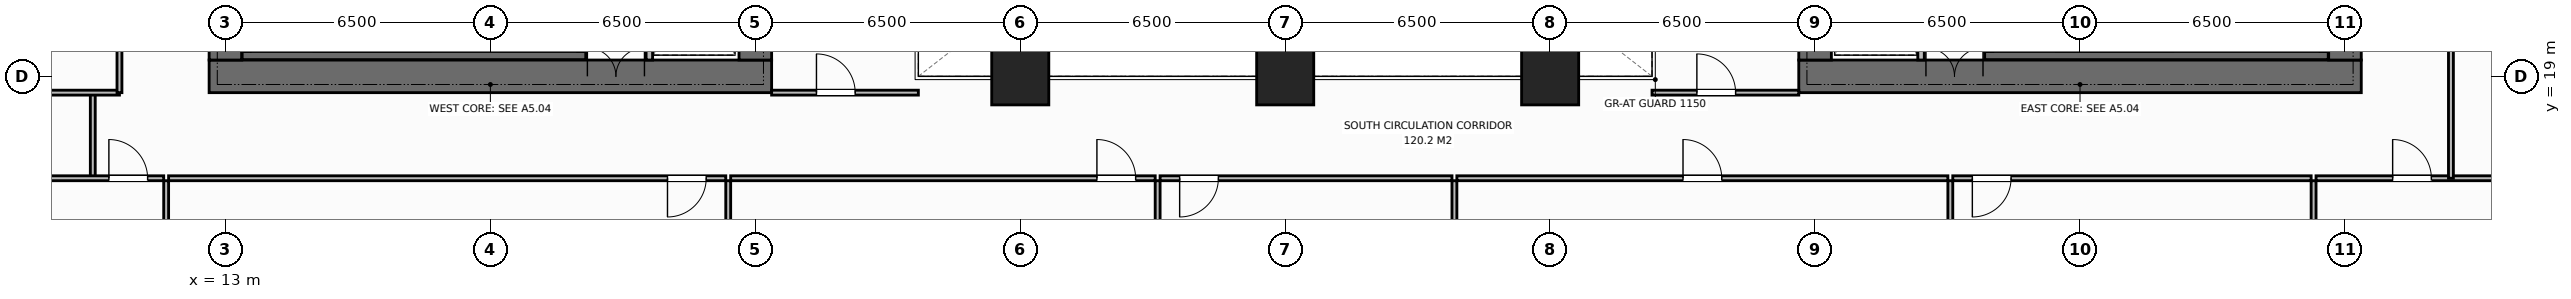
"""IFC4 building model, lengths in metres.
Left out: names, types, materials, properties, quantities, classifications, styles, units other than length and angle.
Written with IfcOpenShell. Run it as: python <this file> out.ifc"""

import sys

from ifc_helpers import new_model, si_unit, direction, frame, frame_2d, origin, origin_2d, place, context, subcontext, project, spatial, rectangle, extrude, element, fill, save


model = new_model("IFC4")
c1 = context("Model", 3, precision=1e-05, world=origin(), true_north=direction((0.0, 1.0)))
c2 = subcontext(c1, "Body", "Model", "MODEL_VIEW")
j1 = project(units=[si_unit("LENGTHUNIT", "METRE"), si_unit("PLANEANGLEUNIT", "RADIAN")], contexts=[c1])
p1 = place(None, origin())
s1 = spatial("IfcSite", under=j1, at=p1, CompositionType="ELEMENT")
p2 = place(p1, origin())
s2 = spatial("IfcBuilding", under=s1, at=p2, CompositionType="ELEMENT")
p3 = place(p2, frame((0.0, 0.0, 73.4)))
s3 = spatial("IfcBuildingStorey", under=s2, at=p3, CompositionType="ELEMENT", Elevation=73.4)
p4 = place(p3, frame((12.6, 19.0, 0.0), z_axis=(0.0, 0.0, 1.0), x_axis=(1.0, 0.0, 0.0)))
e1 = element("IfcWall", 1, at=p4, inside=s3, PredefinedType="SHEAR", context=c2, shape_type="SweptSolid", body=[
    extrude(rectangle(XDim=13.8, YDim=0.8, at=frame_2d((6.9, 0.0))), origin(), (0.0, 0.0, 1.0), 3.8),
])
p5 = place(p4, frame((9.28, 0.0, 0.0)))
e2 = element("IfcOpeningElement", 2, at=p5, cuts=e1, PredefinedType="OPENING", context=c2, shape_type="SweptSolid", body=[
    extrude(rectangle(XDim=1.4, YDim=2.2, at=frame_2d((0.7, 1.1))), frame((0.0, 0.41, 0.0), z_axis=(0.0, -1.0, 0.0), x_axis=(1.0, 0.0, 0.0)), (0.0, 0.0, 1.0), 0.82),
])
p6 = place(p3, frame((13.0, 19.4, 0.0), z_axis=(0.0, 0.0, 1.0), x_axis=(0.0, 1.0, 0.0)))
e3 = element("IfcWall", 3, at=p6, inside=s3, PredefinedType="SHEAR", context=c2, shape_type="SweptSolid", body=[
    extrude(rectangle(XDim=13.2, YDim=0.8, at=frame_2d((6.6, 0.0))), origin(), (0.0, 0.0, 1.0), 3.8),
])
p7 = place(p6, frame((4.65, 0.0, 0.0)))
e4 = element("IfcOpeningElement", 4, at=p7, cuts=e3, PredefinedType="OPENING", context=c2, shape_type="SweptSolid", body=[
    extrude(rectangle(XDim=1.4, YDim=2.2, at=frame_2d((0.7, 1.1))), frame((0.0, 0.41, 0.0), z_axis=(0.0, -1.0, 0.0), x_axis=(1.0, 0.0, 0.0)), (0.0, 0.0, 1.0), 0.82),
])
p8 = place(p3, frame((26.0, 19.4, 0.0), z_axis=(0.0, 0.0, 1.0), x_axis=(0.0, 1.0, 0.0)))
e5 = element("IfcWall", 5, at=p8, inside=s3, PredefinedType="SHEAR", context=c2, shape_type="SweptSolid", body=[
    extrude(rectangle(XDim=13.2, YDim=0.8, at=frame_2d((6.6, 0.0))), origin(), (0.0, 0.0, 1.0), 3.8),
])
p9 = place(p3, frame((51.6, 19.0, 0.0), z_axis=(0.0, 0.0, 1.0), x_axis=(1.0, 0.0, 0.0)))
e6 = element("IfcWall", 6, at=p9, inside=s3, PredefinedType="SHEAR", context=c2, shape_type="SweptSolid", body=[
    extrude(rectangle(XDim=13.8, YDim=0.8, at=frame_2d((6.9, 0.0))), origin(), (0.0, 0.0, 1.0), 3.8),
])
p10 = place(p9, frame((3.12, 0.0, 0.0)))
e7 = element("IfcOpeningElement", 7, at=p10, cuts=e6, PredefinedType="OPENING", context=c2, shape_type="SweptSolid", body=[
    extrude(rectangle(XDim=1.4, YDim=2.2, at=frame_2d((0.7, 1.1))), frame((0.0, 0.41, 0.0), z_axis=(0.0, -1.0, 0.0), x_axis=(1.0, 0.0, 0.0)), (0.0, 0.0, 1.0), 0.82),
])
p11 = place(p3, frame((52.0, 19.4, 0.0), z_axis=(0.0, 0.0, 1.0), x_axis=(0.0, 1.0, 0.0)))
e8 = element("IfcWall", 8, at=p11, inside=s3, PredefinedType="SHEAR", context=c2, shape_type="SweptSolid", body=[
    extrude(rectangle(XDim=13.2, YDim=0.8, at=frame_2d((6.6, 0.0))), origin(), (0.0, 0.0, 1.0), 3.8),
])
p12 = place(p3, frame((65.0, 19.4, 0.0), z_axis=(0.0, 0.0, 1.0), x_axis=(0.0, 1.0, 0.0)))
e9 = element("IfcWall", 9, at=p12, inside=s3, PredefinedType="SHEAR", context=c2, shape_type="SweptSolid", body=[
    extrude(rectangle(XDim=13.2, YDim=0.8, at=frame_2d((6.6, 0.0))), origin(), (0.0, 0.0, 1.0), 3.8),
])
p13 = place(p12, frame((8.05, 0.0, 0.0)))
e10 = element("IfcOpeningElement", 10, at=p13, cuts=e9, PredefinedType="OPENING", context=c2, shape_type="SweptSolid", body=[
    extrude(rectangle(XDim=1.3, YDim=2.2, at=frame_2d((0.65, 1.1))), frame((0.0, 0.41, 0.0), z_axis=(0.0, -1.0, 0.0), x_axis=(1.0, 0.0, 0.0)), (0.0, 0.0, 1.0), 0.82),
])
for number, where, z_axis, x_axis in (
    (11, (13.41, 19.51, 0.0), (0.0, 0.0, 1.0), (1.0, 0.0, 0.0)),
    (12, (56.16, 19.51, 0.0), (0.0, 0.0, 1.0), (1.0, 0.0, 0.0)),
):
    element("IfcWall", number, at=place(p3, frame(where, z_axis=z_axis, x_axis=x_axis)), inside=s3, PredefinedType="SHEAR", context=c2, shape_type="SweptSolid", body=[
        extrude(rectangle(XDim=8.43, YDim=0.2, at=frame_2d((4.215, 0.0))), origin(), (0.0, 0.0, 1.0), 3.8),
    ])
for number, where, z_axis, x_axis in (
    (13, (32.5, 19.0, 0.0), (0.0, 0.0, 1.0), (1.0, 0.0, 0.0)),
    (14, (39.0, 19.0, 0.0), (0.0, 0.0, 1.0), (1.0, 0.0, 0.0)),
    (15, (45.5, 19.0, 0.0), (0.0, 0.0, 1.0), (1.0, 0.0, 0.0)),
):
    element("IfcColumn", number, at=place(p3, frame(where, z_axis=z_axis, x_axis=x_axis)), inside=s3, PredefinedType="COLUMN", context=c2, shape_type="SweptSolid", body=[
        extrude(rectangle(XDim=1.4, YDim=1.4, at=origin_2d()), origin(), (0.0, 0.0, 1.0), 3.8),
    ])
p14 = place(p3, frame((23.4, 19.4, 0.0), z_axis=(0.0, 0.0, 1.0), x_axis=(0.0, 1.0, 0.0)))
e16 = element("IfcWall", 16, at=p14, inside=s3, PredefinedType="STANDARD", context=c2, shape_type="SweptSolid", body=[
    extrude(rectangle(XDim=13.2, YDim=0.16, at=frame_2d((6.6, 0.0))), origin(), (0.0, 0.0, 1.0), 3.55),
])
p15 = place(p14, frame((0.55, 0.0, 0.0)))
e17 = element("IfcOpeningElement", 17, at=p15, cuts=e16, PredefinedType="OPENING", context=c2, shape_type="SweptSolid", body=[
    extrude(rectangle(XDim=1.1, YDim=2.2, at=frame_2d((0.55, 1.1))), frame((0.0, 0.09, 0.0), z_axis=(0.0, -1.0, 0.0), x_axis=(1.0, 0.0, 0.0)), (0.0, 0.0, 1.0), 0.18),
])
p16 = place(p14, frame((2.7, 0.0, 0.0)))
e18 = element("IfcOpeningElement", 18, at=p16, cuts=e16, PredefinedType="OPENING", context=c2, shape_type="SweptSolid", body=[
    extrude(rectangle(XDim=1.1, YDim=2.2, at=frame_2d((0.55, 1.1))), frame((0.0, 0.09, 0.0), z_axis=(0.0, -1.0, 0.0), x_axis=(1.0, 0.0, 0.0)), (0.0, 0.0, 1.0), 0.18),
])
p17 = place(p3, frame((54.6, 19.4, 0.0), z_axis=(0.0, 0.0, 1.0), x_axis=(0.0, 1.0, 0.0)))
e19 = element("IfcWall", 19, at=p17, inside=s3, PredefinedType="STANDARD", context=c2, shape_type="SweptSolid", body=[
    extrude(rectangle(XDim=13.2, YDim=0.16, at=frame_2d((6.6, 0.0))), origin(), (0.0, 0.0, 1.0), 3.55),
])
p18 = place(p17, frame((0.55, 0.0, 0.0)))
e20 = element("IfcOpeningElement", 20, at=p18, cuts=e19, PredefinedType="OPENING", context=c2, shape_type="SweptSolid", body=[
    extrude(rectangle(XDim=1.1, YDim=2.2, at=frame_2d((0.55, 1.1))), frame((0.0, 0.09, 0.0), z_axis=(0.0, -1.0, 0.0), x_axis=(1.0, 0.0, 0.0)), (0.0, 0.0, 1.0), 0.18),
])
p19 = place(p17, frame((2.7, 0.0, 0.0)))
e21 = element("IfcOpeningElement", 21, at=p19, cuts=e19, PredefinedType="OPENING", context=c2, shape_type="SweptSolid", body=[
    extrude(rectangle(XDim=1.1, YDim=2.2, at=frame_2d((0.55, 1.1))), frame((0.0, 0.09, 0.0), z_axis=(0.0, -1.0, 0.0), x_axis=(1.0, 0.0, 0.0)), (0.0, 0.0, 1.0), 0.18),
])
p20 = place(p3, frame((26.4, 18.6, 0.0), z_axis=(0.0, 0.0, 1.0), x_axis=(1.0, 0.0, 0.0)))
e22 = element("IfcWall", 22, at=p20, inside=s3, PredefinedType="PARTITIONING", context=c2, shape_type="SweptSolid", body=[
    extrude(rectangle(XDim=3.6, YDim=0.12, at=frame_2d((1.8, 0.0))), origin(), (0.0, 0.0, 1.0), 3.55),
])
p21 = place(p20, frame((1.1, 0.0, 0.0)))
e23 = element("IfcOpeningElement", 23, at=p21, cuts=e22, PredefinedType="OPENING", context=c2, shape_type="SweptSolid", body=[
    extrude(rectangle(XDim=0.95, YDim=2.15, at=frame_2d((0.475, 1.075))), frame((0.0, 0.07, 0.0), z_axis=(0.0, -1.0, 0.0), x_axis=(1.0, 0.0, 0.0)), (0.0, 0.0, 1.0), 0.14),
])
p22 = place(p3, frame((48.0, 18.6, 0.0), z_axis=(0.0, 0.0, 1.0), x_axis=(1.0, 0.0, 0.0)))
e24 = element("IfcWall", 24, at=p22, inside=s3, PredefinedType="PARTITIONING", context=c2, shape_type="SweptSolid", body=[
    extrude(rectangle(XDim=3.6, YDim=0.12, at=frame_2d((1.8, 0.0))), origin(), (0.0, 0.0, 1.0), 3.55),
])
p23 = place(p22, frame((1.1, 0.0, 0.0)))
e25 = element("IfcOpeningElement", 25, at=p23, cuts=e24, PredefinedType="OPENING", context=c2, shape_type="SweptSolid", body=[
    extrude(rectangle(XDim=0.95, YDim=2.15, at=frame_2d((0.475, 1.075))), frame((0.0, 0.07, 0.0), z_axis=(0.0, -1.0, 0.0), x_axis=(1.0, 0.0, 0.0)), (0.0, 0.0, 1.0), 0.14),
])
p24 = place(p3, frame((9.746, 16.5, 0.0), z_axis=(0.0, 0.0, 1.0), x_axis=(0.0, 1.0, 0.0)))
e26 = element("IfcWall", 26, at=p24, inside=s3, PredefinedType="PARTITIONING", context=c2, shape_type="SweptSolid", body=[
    extrude(rectangle(XDim=2.1, YDim=0.12, at=frame_2d((1.05, 0.0))), origin(), (0.0, 0.0, 1.0), 3.55),
])
p25 = place(p3, frame((11.545, 0.02, 0.0), z_axis=(0.0, 0.0, 1.0), x_axis=(0.0, 1.0, 0.0)))
e27 = element("IfcWall", 27, at=p25, inside=s3, PredefinedType="PARTITIONING", context=c2, shape_type="SweptSolid", body=[
    extrude(rectangle(XDim=16.42, YDim=0.12, at=frame_2d((8.21, 0.0))), origin(), (0.0, 0.0, 1.0), 3.55),
])
p26 = place(p3, frame((-0.02, 16.5, 0.0), z_axis=(0.0, 0.0, 1.0), x_axis=(1.0, 0.0, 0.0)))
e28 = element("IfcWall", 28, at=p26, inside=s3, PredefinedType="PARTITIONING", context=c2, shape_type="SweptSolid", body=[
    extrude(rectangle(XDim=11.506, YDim=0.12, at=frame_2d((5.753, 0.0))), origin(), (0.0, 0.0, 1.0), 3.55),
])
p27 = place(p26, frame((10.16, 0.0, 0.0)))
e29 = element("IfcOpeningElement", 29, at=p27, cuts=e28, PredefinedType="OPENING", context=c2, shape_type="SweptSolid", body=[
    extrude(rectangle(XDim=0.95, YDim=2.15, at=frame_2d((0.475, 1.075))), frame((0.0, 0.07, 0.0), z_axis=(0.0, -1.0, 0.0), x_axis=(1.0, 0.0, 0.0)), (0.0, 0.0, 1.0), 0.14),
])
p28 = place(p3, frame((25.335, 0.02, 0.0), z_axis=(0.0, 0.0, 1.0), x_axis=(0.0, 1.0, 0.0)))
e30 = element("IfcWall", 30, at=p28, inside=s3, PredefinedType="PARTITIONING", context=c2, shape_type="SweptSolid", body=[
    extrude(rectangle(XDim=16.42, YDim=0.12, at=frame_2d((8.21, 0.0))), origin(), (0.0, 0.0, 1.0), 3.55),
])
p29 = place(p3, frame((11.605, 16.5, 0.0), z_axis=(0.0, 0.0, 1.0), x_axis=(1.0, 0.0, 0.0)))
e31 = element("IfcWall", 31, at=p29, inside=s3, PredefinedType="PARTITIONING", context=c2, shape_type="SweptSolid", body=[
    extrude(rectangle(XDim=13.67, YDim=0.12, at=frame_2d((6.835, 0.0))), origin(), (0.0, 0.0, 1.0), 3.55),
])
p30 = place(p29, frame((12.24, 0.0, 0.0)))
e32 = element("IfcOpeningElement", 32, at=p30, cuts=e31, PredefinedType="OPENING", context=c2, shape_type="SweptSolid", body=[
    extrude(rectangle(XDim=0.95, YDim=2.15, at=frame_2d((0.475, 1.075))), frame((0.0, 0.07, 0.0), z_axis=(0.0, -1.0, 0.0), x_axis=(1.0, 0.0, 0.0)), (0.0, 0.0, 1.0), 0.14),
])
p31 = place(p3, frame((35.871, 0.02, 0.0), z_axis=(0.0, 0.0, 1.0), x_axis=(0.0, 1.0, 0.0)))
e33 = element("IfcWall", 33, at=p31, inside=s3, PredefinedType="PARTITIONING", context=c2, shape_type="SweptSolid", body=[
    extrude(rectangle(XDim=16.42, YDim=0.12, at=frame_2d((8.21, 0.0))), origin(), (0.0, 0.0, 1.0), 3.55),
])
p32 = place(p3, frame((25.395, 16.5, 0.0), z_axis=(0.0, 0.0, 1.0), x_axis=(1.0, 0.0, 0.0)))
e34 = element("IfcWall", 34, at=p32, inside=s3, PredefinedType="PARTITIONING", context=c2, shape_type="SweptSolid", body=[
    extrude(rectangle(XDim=10.415, YDim=0.12, at=frame_2d((5.208, 0.0))), origin(), (0.0, 0.0, 1.0), 3.55),
])
p33 = place(p32, frame((8.985, 0.0, 0.0)))
e35 = element("IfcOpeningElement", 35, at=p33, cuts=e34, PredefinedType="OPENING", context=c2, shape_type="SweptSolid", body=[
    extrude(rectangle(XDim=0.95, YDim=2.15, at=frame_2d((0.475, 1.075))), frame((0.0, 0.07, 0.0), z_axis=(0.0, -1.0, 0.0), x_axis=(1.0, 0.0, 0.0)), (0.0, 0.0, 1.0), 0.14),
])
p34 = place(p3, frame((43.152, 0.02, 0.0), z_axis=(0.0, 0.0, 1.0), x_axis=(0.0, 1.0, 0.0)))
e36 = element("IfcWall", 36, at=p34, inside=s3, PredefinedType="PARTITIONING", context=c2, shape_type="SweptSolid", body=[
    extrude(rectangle(XDim=16.42, YDim=0.12, at=frame_2d((8.21, 0.0))), origin(), (0.0, 0.0, 1.0), 3.55),
])
p35 = place(p3, frame((35.931, 16.5, 0.0), z_axis=(0.0, 0.0, 1.0), x_axis=(1.0, 0.0, 0.0)))
e37 = element("IfcWall", 37, at=p35, inside=s3, PredefinedType="PARTITIONING", context=c2, shape_type="SweptSolid", body=[
    extrude(rectangle(XDim=7.161, YDim=0.12, at=frame_2d((3.581, 0.0))), origin(), (0.0, 0.0, 1.0), 3.55),
])
p36 = place(p35, frame((0.48, 0.0, 0.0)))
e38 = element("IfcOpeningElement", 38, at=p36, cuts=e37, PredefinedType="OPENING", context=c2, shape_type="SweptSolid", body=[
    extrude(rectangle(XDim=0.95, YDim=2.15, at=frame_2d((0.475, 1.075))), frame((0.0, 0.07, 0.0), z_axis=(0.0, -1.0, 0.0), x_axis=(1.0, 0.0, 0.0)), (0.0, 0.0, 1.0), 0.14),
])
p37 = place(p3, frame((55.318, 0.02, 0.0), z_axis=(0.0, 0.0, 1.0), x_axis=(0.0, 1.0, 0.0)))
e39 = element("IfcWall", 39, at=p37, inside=s3, PredefinedType="PARTITIONING", context=c2, shape_type="SweptSolid", body=[
    extrude(rectangle(XDim=16.42, YDim=0.12, at=frame_2d((8.21, 0.0))), origin(), (0.0, 0.0, 1.0), 3.55),
])
p38 = place(p3, frame((43.212, 16.5, 0.0), z_axis=(0.0, 0.0, 1.0), x_axis=(1.0, 0.0, 0.0)))
e40 = element("IfcWall", 40, at=p38, inside=s3, PredefinedType="PARTITIONING", context=c2, shape_type="SweptSolid", body=[
    extrude(rectangle(XDim=12.047, YDim=0.12, at=frame_2d((6.023, 0.0))), origin(), (0.0, 0.0, 1.0), 3.55),
])
p39 = place(p38, frame((5.548, 0.0, 0.0)))
e41 = element("IfcOpeningElement", 41, at=p39, cuts=e40, PredefinedType="OPENING", context=c2, shape_type="SweptSolid", body=[
    extrude(rectangle(XDim=0.95, YDim=2.15, at=frame_2d((0.475, 1.075))), frame((0.0, 0.07, 0.0), z_axis=(0.0, -1.0, 0.0), x_axis=(1.0, 0.0, 0.0)), (0.0, 0.0, 1.0), 0.14),
])
p40 = place(p3, frame((64.23, 0.02, 0.0), z_axis=(0.0, 0.0, 1.0), x_axis=(0.0, 1.0, 0.0)))
e42 = element("IfcWall", 42, at=p40, inside=s3, PredefinedType="PARTITIONING", context=c2, shape_type="SweptSolid", body=[
    extrude(rectangle(XDim=16.42, YDim=0.12, at=frame_2d((8.21, 0.0))), origin(), (0.0, 0.0, 1.0), 3.55),
])
p41 = place(p3, frame((55.378, 16.5, 0.0), z_axis=(0.0, 0.0, 1.0), x_axis=(1.0, 0.0, 0.0)))
e43 = element("IfcWall", 43, at=p41, inside=s3, PredefinedType="PARTITIONING", context=c2, shape_type="SweptSolid", body=[
    extrude(rectangle(XDim=8.792, YDim=0.12, at=frame_2d((4.396, 0.0))), origin(), (0.0, 0.0, 1.0), 3.55),
])
p42 = place(p41, frame((0.48, 0.0, 0.0)))
e44 = element("IfcOpeningElement", 44, at=p42, cuts=e43, PredefinedType="OPENING", context=c2, shape_type="SweptSolid", body=[
    extrude(rectangle(XDim=0.95, YDim=2.15, at=frame_2d((0.475, 1.075))), frame((0.0, 0.07, 0.0), z_axis=(0.0, -1.0, 0.0), x_axis=(1.0, 0.0, 0.0)), (0.0, 0.0, 1.0), 0.14),
])
p43 = place(p3, frame((64.29, 16.5, 0.0), z_axis=(0.0, 0.0, 1.0), x_axis=(1.0, 0.0, 0.0)))
e45 = element("IfcWall", 45, at=p43, inside=s3, PredefinedType="PARTITIONING", context=c2, shape_type="SweptSolid", body=[
    extrude(rectangle(XDim=13.73, YDim=0.12, at=frame_2d((6.865, 0.0))), origin(), (0.0, 0.0, 1.0), 3.55),
])
p44 = place(p43, frame((1.88, 0.0, 0.0)))
e46 = element("IfcOpeningElement", 46, at=p44, cuts=e45, PredefinedType="OPENING", context=c2, shape_type="SweptSolid", body=[
    extrude(rectangle(XDim=0.95, YDim=2.15, at=frame_2d((0.475, 1.075))), frame((0.0, 0.07, 0.0), z_axis=(0.0, -1.0, 0.0), x_axis=(1.0, 0.0, 0.0)), (0.0, 0.0, 1.0), 0.14),
])
p45 = place(p3, frame((-0.18, 18.6, 0.0), z_axis=(0.0, 0.0, 1.0), x_axis=(1.0, 0.0, 0.0)))
e47 = element("IfcWall", 47, at=p45, inside=s3, PredefinedType="PARTITIONING", context=c2, shape_type="SweptSolid", body=[
    extrude(rectangle(XDim=10.58, YDim=0.12, at=frame_2d((5.29, 0.0))), origin(), (0.0, 0.0, 1.0), 3.55),
])
p46 = place(p3, frame((10.4, 18.6, 0.0), z_axis=(0.0, 0.0, 1.0), x_axis=(0.0, 1.0, 0.0)))
e48 = element("IfcWall", 48, at=p46, inside=s3, PredefinedType="PARTITIONING", context=c2, shape_type="SweptSolid", body=[
    extrude(rectangle(XDim=8.45, YDim=0.12, at=frame_2d((4.225, 0.0))), origin(), (0.0, 0.0, 1.0), 3.55),
])
p47 = place(p46, frame((3.75, 0.0, 0.0)))
e49 = element("IfcOpeningElement", 49, at=p47, cuts=e48, PredefinedType="OPENING", context=c2, shape_type="SweptSolid", body=[
    extrude(rectangle(XDim=0.95, YDim=2.15, at=frame_2d((0.475, 1.075))), frame((0.0, 0.07, 0.0), z_axis=(0.0, -1.0, 0.0), x_axis=(1.0, 0.0, 0.0)), (0.0, 0.0, 1.0), 0.14),
])
p48 = place(p3, frame((67.6, 16.5, 0.0), z_axis=(0.0, 0.0, 1.0), x_axis=(0.0, 1.0, 0.0)))
e50 = element("IfcWall", 50, at=p48, inside=s3, PredefinedType="PARTITIONING", context=c2, shape_type="SweptSolid", body=[
    extrude(rectangle(XDim=16.9, YDim=0.12, at=frame_2d((8.45, 0.0))), origin(), (0.0, 0.0, 1.0), 3.55),
])
p49 = place(p48, frame((9.025, 0.0, 0.0)))
e51 = element("IfcOpeningElement", 51, at=p49, cuts=e50, PredefinedType="OPENING", context=c2, shape_type="SweptSolid", body=[
    extrude(rectangle(XDim=0.95, YDim=2.15, at=frame_2d((0.475, 1.075))), frame((0.0, 0.07, 0.0), z_axis=(0.0, -1.0, 0.0), x_axis=(1.0, 0.0, 0.0)), (0.0, 0.0, 1.0), 0.14),
])
p50 = place(p5, origin())
e52 = element("IfcDoor", 52, at=p50, inside=s3, OperationType="DOUBLE_DOOR_SINGLE_SWING", PredefinedType="DOOR", context=c2, shape_type="SweptSolid", body=[
    extrude(rectangle(XDim=1.4, YDim=2.2, at=frame_2d((0.7, 1.1))), frame((0.0, 0.125, 0.0), z_axis=(0.0, -1.0, 0.0), x_axis=(1.0, 0.0, 0.0)), (0.0, 0.0, 1.0), 0.05),
])
fill(e2, e52)
p51 = place(p10, origin())
e53 = element("IfcDoor", 53, at=p51, inside=s3, OperationType="DOUBLE_DOOR_SINGLE_SWING", PredefinedType="DOOR", context=c2, shape_type="SweptSolid", body=[
    extrude(rectangle(XDim=1.4, YDim=2.2, at=frame_2d((0.7, 1.1))), frame((0.0, 0.125, 0.0), z_axis=(0.0, -1.0, 0.0), x_axis=(1.0, 0.0, 0.0)), (0.0, 0.0, 1.0), 0.05),
])
fill(e7, e53)
p52 = place(p21, origin())
e54 = element("IfcDoor", 54, at=p52, inside=s3, OperationType="SINGLE_SWING_LEFT", PredefinedType="DOOR", context=c2, shape_type="SweptSolid", body=[
    extrude(rectangle(XDim=0.95, YDim=2.15, at=frame_2d((0.475, 1.075))), frame((0.0, 0.025, 0.0), z_axis=(0.0, -1.0, 0.0), x_axis=(1.0, 0.0, 0.0)), (0.0, 0.0, 1.0), 0.05),
])
fill(e23, e54)
p53 = place(p23, origin())
e55 = element("IfcDoor", 55, at=p53, inside=s3, OperationType="SINGLE_SWING_LEFT", PredefinedType="DOOR", context=c2, shape_type="SweptSolid", body=[
    extrude(rectangle(XDim=0.95, YDim=2.15, at=frame_2d((0.475, 1.075))), frame((0.0, 0.025, 0.0), z_axis=(0.0, -1.0, 0.0), x_axis=(1.0, 0.0, 0.0)), (0.0, 0.0, 1.0), 0.05),
])
fill(e25, e55)
p54 = place(p27, origin())
e56 = element("IfcDoor", 56, at=p54, inside=s3, OperationType="SINGLE_SWING_LEFT", PredefinedType="DOOR", context=c2, shape_type="SweptSolid", body=[
    extrude(rectangle(XDim=0.95, YDim=2.15, at=frame_2d((0.475, 1.075))), frame((0.0, 0.025, 0.0), z_axis=(0.0, -1.0, 0.0), x_axis=(1.0, 0.0, 0.0)), (0.0, 0.0, 1.0), 0.05),
])
fill(e29, e56)
p55 = place(p30, origin())
e57 = element("IfcDoor", 57, at=p55, inside=s3, OperationType="SINGLE_SWING_RIGHT", PredefinedType="DOOR", context=c2, shape_type="SweptSolid", body=[
    extrude(rectangle(XDim=0.95, YDim=2.15, at=frame_2d((0.475, 1.075))), frame((0.0, 0.025, 0.0), z_axis=(0.0, -1.0, 0.0), x_axis=(1.0, 0.0, 0.0)), (0.0, 0.0, 1.0), 0.05),
])
fill(e32, e57)
p56 = place(p33, origin())
e58 = element("IfcDoor", 58, at=p56, inside=s3, OperationType="SINGLE_SWING_LEFT", PredefinedType="DOOR", context=c2, shape_type="SweptSolid", body=[
    extrude(rectangle(XDim=0.95, YDim=2.15, at=frame_2d((0.475, 1.075))), frame((0.0, 0.025, 0.0), z_axis=(0.0, -1.0, 0.0), x_axis=(1.0, 0.0, 0.0)), (0.0, 0.0, 1.0), 0.05),
])
fill(e35, e58)
p57 = place(p36, origin())
e59 = element("IfcDoor", 59, at=p57, inside=s3, OperationType="SINGLE_SWING_RIGHT", PredefinedType="DOOR", context=c2, shape_type="SweptSolid", body=[
    extrude(rectangle(XDim=0.95, YDim=2.15, at=frame_2d((0.475, 1.075))), frame((0.0, 0.025, 0.0), z_axis=(0.0, -1.0, 0.0), x_axis=(1.0, 0.0, 0.0)), (0.0, 0.0, 1.0), 0.05),
])
fill(e38, e59)
p58 = place(p39, origin())
e60 = element("IfcDoor", 60, at=p58, inside=s3, OperationType="SINGLE_SWING_LEFT", PredefinedType="DOOR", context=c2, shape_type="SweptSolid", body=[
    extrude(rectangle(XDim=0.95, YDim=2.15, at=frame_2d((0.475, 1.075))), frame((0.0, 0.025, 0.0), z_axis=(0.0, -1.0, 0.0), x_axis=(1.0, 0.0, 0.0)), (0.0, 0.0, 1.0), 0.05),
])
fill(e41, e60)
p59 = place(p42, origin())
e61 = element("IfcDoor", 61, at=p59, inside=s3, OperationType="SINGLE_SWING_RIGHT", PredefinedType="DOOR", context=c2, shape_type="SweptSolid", body=[
    extrude(rectangle(XDim=0.95, YDim=2.15, at=frame_2d((0.475, 1.075))), frame((0.0, 0.025, 0.0), z_axis=(0.0, -1.0, 0.0), x_axis=(1.0, 0.0, 0.0)), (0.0, 0.0, 1.0), 0.05),
])
fill(e44, e61)
p60 = place(p44, origin())
e62 = element("IfcDoor", 62, at=p60, inside=s3, OperationType="SINGLE_SWING_LEFT", PredefinedType="DOOR", context=c2, shape_type="SweptSolid", body=[
    extrude(rectangle(XDim=0.95, YDim=2.15, at=frame_2d((0.475, 1.075))), frame((0.0, 0.025, 0.0), z_axis=(0.0, -1.0, 0.0), x_axis=(1.0, 0.0, 0.0)), (0.0, 0.0, 1.0), 0.05),
])
fill(e46, e62)
save(model, sys.argv[1])
